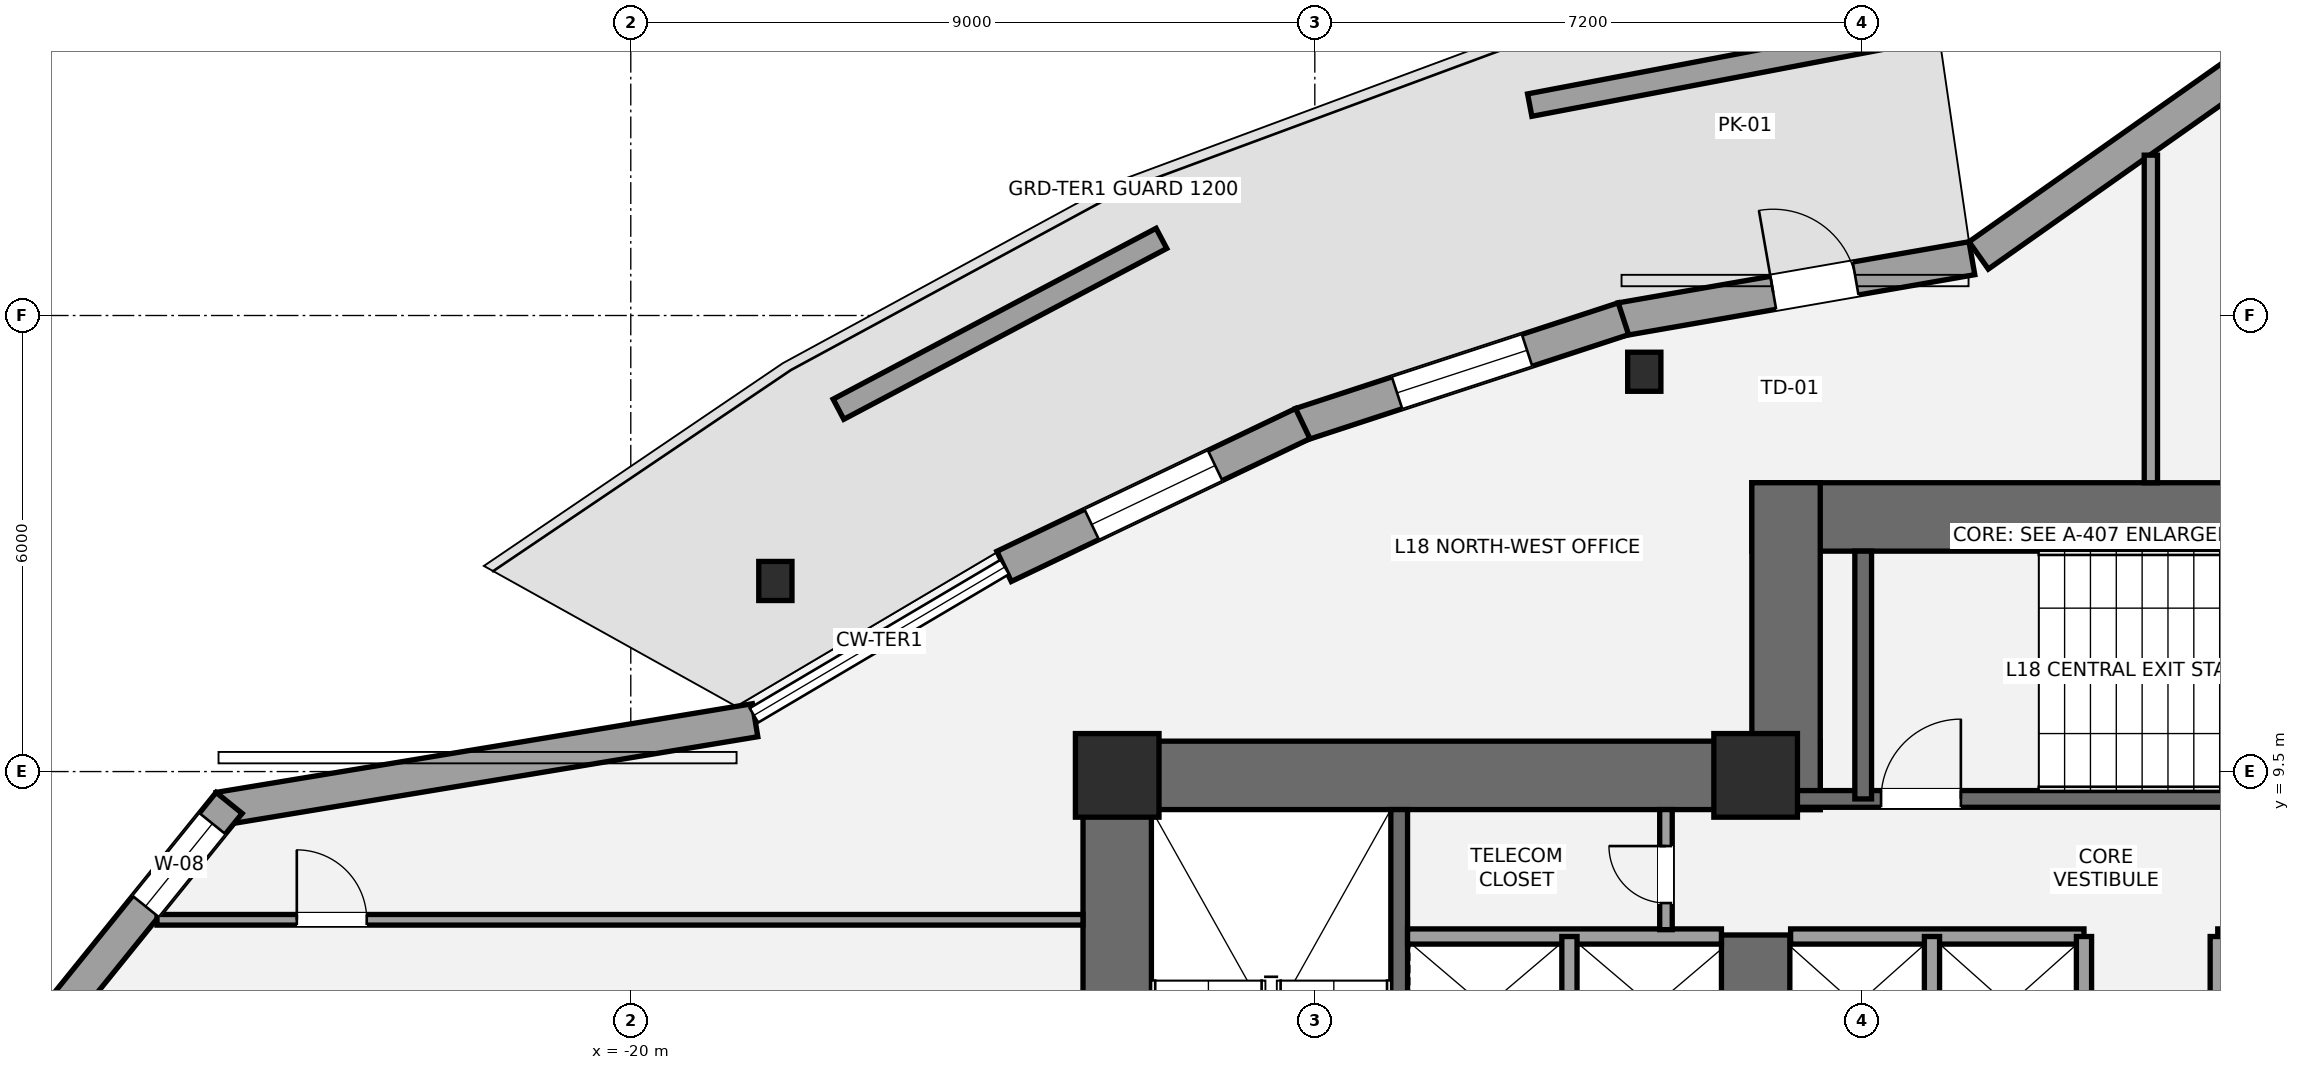
"""IFC4 building model, lengths in metres.
Left out: names, types, materials, properties, quantities, classifications, styles, units other than length and angle.
Written with IfcOpenShell. Run it as: python <this file> out.ifc"""

import sys

from ifc_helpers import new_model, si_unit, direction, frame, frame_2d, origin, origin_2d, place, context, subcontext, project, spatial, rectangle, i_section, extrude, element, fill, save


model = new_model("IFC4")
c1 = context("Model", 3, precision=1e-05, world=origin(), true_north=direction((0.0, 1.0)))
c2 = subcontext(c1, "Body", "Model", "MODEL_VIEW")
j1 = project(units=[si_unit("LENGTHUNIT", "METRE"), si_unit("PLANEANGLEUNIT", "RADIAN")], contexts=[c1])
p1 = place(None, origin())
s1 = spatial("IfcSite", under=j1, at=p1, CompositionType="ELEMENT")
p2 = place(p1, origin())
s2 = spatial("IfcBuilding", under=s1, at=p2, CompositionType="ELEMENT")
p3 = place(p2, frame((0.0, 0.0, 70.2)))
s3 = spatial("IfcBuildingStorey", under=s2, at=p3, CompositionType="ELEMENT", Elevation=70.2)
p4 = place(p3, frame((-13.6, 0.95, 0.0), z_axis=(0.0, 0.0, 1.0), x_axis=(0.0, 1.0, 0.0)))
e1 = element("IfcWall", 1, at=p4, inside=s3, PredefinedType="SHEAR", context=c2, shape_type="SweptSolid", body=[
    extrude(rectangle(XDim=8.95, YDim=0.9, at=frame_2d((4.475, 0.0))), origin(), (0.0, 0.0, 1.0), 3.6),
])
p5 = place(p3, frame((-14.05, 9.45, 0.0), z_axis=(0.0, 0.0, 1.0), x_axis=(1.0, 0.0, 0.0)))
e2 = element("IfcWall", 2, at=p5, inside=s3, PredefinedType="SHEAR", context=c2, shape_type="SweptSolid", body=[
    extrude(rectangle(XDim=9.7, YDim=0.9, at=frame_2d((4.85, 0.0))), origin(), (0.0, 0.0, 1.0), 3.6),
])
p6 = place(p3, frame((-5.2, 5.35, 0.0), z_axis=(0.0, 0.0, 1.0), x_axis=(0.0, 1.0, 0.0)))
e3 = element("IfcWall", 3, at=p6, inside=s3, PredefinedType="SHEAR", context=c2, shape_type="SweptSolid", body=[
    extrude(rectangle(XDim=2.0, YDim=0.9, at=frame_2d((1.0, 0.0))), origin(), (0.0, 0.0, 1.0), 3.6),
])
p7 = place(p3, frame((-9.89, 1.85, 0.0), z_axis=(0.0, 0.0, 1.0), x_axis=(0.0, 1.0, 0.0)))
e4 = element("IfcWall", 4, at=p7, inside=s3, PredefinedType="SHEAR", context=c2, shape_type="SweptSolid", body=[
    extrude(rectangle(XDim=7.15, YDim=0.22, at=frame_2d((3.575, 0.0))), origin(), (0.0, 0.0, 1.0), 3.6),
])
p8 = place(p3, frame((-5.25, 12.85, 0.0), z_axis=(0.0, 0.0, 1.0), x_axis=(1.0, 0.0, 0.0)))
e5 = element("IfcWall", 5, at=p8, inside=s3, PredefinedType="SHEAR", context=c2, shape_type="SweptSolid", body=[
    extrude(rectangle(XDim=10.5, YDim=0.9, at=frame_2d((5.25, 0.0))), origin(), (0.0, 0.0, 1.0), 3.6),
])
p9 = place(p3, frame((-4.8, 9.0, 0.0), z_axis=(0.0, 0.0, 1.0), x_axis=(0.0, 1.0, 0.0)))
e6 = element("IfcWall", 6, at=p9, inside=s3, PredefinedType="SHEAR", context=c2, shape_type="SweptSolid", body=[
    extrude(rectangle(XDim=4.3, YDim=0.9, at=frame_2d((2.15, 0.0))), origin(), (0.0, 0.0, 1.0), 3.6),
])
p10 = place(p3, frame((-4.7, 9.14, 0.0), z_axis=(0.0, 0.0, 1.0), x_axis=(1.0, 0.0, 0.0)))
e7 = element("IfcWall", 7, at=p10, inside=s3, PredefinedType="SHEAR", context=c2, shape_type="SweptSolid", body=[
    extrude(rectangle(XDim=9.3, YDim=0.22, at=frame_2d((4.65, 0.0))), origin(), (0.0, 0.0, 1.0), 3.6),
])
p11 = place(p10, frame((1.15, 0.0, 0.0)))
e8 = element("IfcOpeningElement", 8, at=p11, cuts=e7, PredefinedType="OPENING", context=c2, shape_type="SweptSolid", body=[
    extrude(rectangle(XDim=1.05, YDim=2.15, at=frame_2d((0.525, 1.075))), frame((0.0, 0.12, 0.0), z_axis=(0.0, -1.0, 0.0), x_axis=(1.0, 0.0, 0.0)), (0.0, 0.0, 1.0), 0.24),
])
p12 = place(p3, frame((-3.785, 9.14, 0.0), z_axis=(0.0, 0.0, 1.0), x_axis=(0.0, 1.0, 0.0)))
e9 = element("IfcWall", 9, at=p12, inside=s3, PredefinedType="SHEAR", context=c2, shape_type="SweptSolid", body=[
    extrude(rectangle(XDim=3.26, YDim=0.22, at=frame_2d((1.63, 0.0))), origin(), (0.0, 0.0, 1.0), 3.6),
])
for number, where, z_axis, x_axis in (
    (10, (-13.6, 9.45, 0.0), (0.0, 0.0, 1.0), (1.0, 0.0, 0.0)),
    (11, (-5.2, 9.45, 0.0), (0.0, 0.0, 1.0), (1.0, 0.0, 0.0)),
):
    element("IfcColumn", number, at=place(p3, frame(where, z_axis=z_axis, x_axis=x_axis)), inside=s3, PredefinedType="COLUMN", context=c2, shape_type="SweptSolid", body=[
        extrude(rectangle(XDim=1.1, YDim=1.1, at=origin_2d()), origin(), (0.0, 0.0, 1.0), 3.6),
    ])
for number, where, z_axis, x_axis in (
    (12, (-6.665, 14.76, 0.0), (0.0, 0.0, 1.0), (1.0, 0.0, 0.0)),
    (13, (-18.098, 12.007, 0.0), (0.0, 0.0, 1.0), (1.0, 0.0, 0.0)),
):
    element("IfcColumn", number, at=place(p3, frame(where, z_axis=z_axis, x_axis=x_axis)), inside=s3, PredefinedType="COLUMN", context=c2, shape_type="SweptSolid", body=[
        extrude(i_section(OverallWidth=0.437, OverallDepth=0.514, WebThickness=0.061, FlangeThickness=0.097, at=origin_2d()), origin(), (0.0, 0.0, 1.0), 3.6),
    ])
p13 = place(p3, frame((-2.266, 16.291, 0.0), z_axis=(0.0, 0.0, 1.0), x_axis=(0.817155536966, 0.576417234653, 0.0)))
e14 = element("IfcWall", 14, at=p13, inside=s3, PredefinedType="STANDARD", context=c2, shape_type="SweptSolid", body=[
    extrude(rectangle(XDim=6.524, YDim=0.44, at=frame_2d((3.262, 0.0))), origin(), (0.0, 0.0, 1.0), 2.533),
])
p14 = place(p3, frame((-6.971, 15.45, 0.0), z_axis=(0.0, 0.0, 1.0), x_axis=(0.985170808839, 0.171576447721, 0.0)))
e15 = element("IfcWall", 15, at=p14, inside=s3, PredefinedType="STANDARD", context=c2, shape_type="SweptSolid", body=[
    extrude(rectangle(XDim=4.686, YDim=0.44, at=frame_2d((2.343, 0.0))), origin(), (0.0, 0.0, 1.0), 2.533),
])
p15 = place(p14, frame((2.033, 0.0, 0.0)))
e16 = element("IfcOpeningElement", 16, at=p15, cuts=e15, PredefinedType="OPENING", context=c2, shape_type="SweptSolid", body=[
    extrude(rectangle(XDim=1.1, YDim=2.15, at=frame_2d((0.55, 1.075))), frame((0.0, 0.23, 0.0), z_axis=(0.0, -1.0, 0.0), x_axis=(1.0, 0.0, 0.0)), (0.0, 0.0, 1.0), 0.46),
])
p16 = place(p3, frame((-11.185, 14.067, 0.0), z_axis=(0.0, 0.0, 1.0), x_axis=(0.950342475624, 0.311206007373, 0.0)))
e17 = element("IfcWall", 17, at=p16, inside=s3, PredefinedType="STANDARD", context=c2, shape_type="SweptSolid", body=[
    extrude(rectangle(XDim=4.467, YDim=0.44, at=frame_2d((2.233, 0.0))), origin(), (0.0, 0.0, 1.0), 2.533),
])
p17 = place(p16, frame((1.333, 0.0, 0.65)))
e18 = element("IfcOpeningElement", 18, at=p17, cuts=e17, PredefinedType="OPENING", context=c2, shape_type="SweptSolid", body=[
    extrude(rectangle(XDim=1.8, YDim=1.7, at=frame_2d((0.9, 0.85))), frame((0.0, 0.23, 0.0), z_axis=(0.0, -1.0, 0.0), x_axis=(1.0, 0.0, 0.0)), (0.0, 0.0, 1.0), 0.46),
])
p18 = place(p3, frame((-15.088, 12.199, 0.0), z_axis=(0.0, 0.0, 1.0), x_axis=(0.902212943003, 0.431290859488, 0.0)))
e19 = element("IfcWall", 19, at=p18, inside=s3, PredefinedType="STANDARD", context=c2, shape_type="SweptSolid", body=[
    extrude(rectangle(XDim=4.355, YDim=0.44, at=frame_2d((2.178, 0.0))), origin(), (0.0, 0.0, 1.0), 2.533),
])
p19 = place(p18, frame((1.278, 0.0, 0.65)))
e20 = element("IfcOpeningElement", 20, at=p19, cuts=e19, PredefinedType="OPENING", context=c2, shape_type="SweptSolid", body=[
    extrude(rectangle(XDim=1.8, YDim=1.7, at=frame_2d((0.9, 0.85))), frame((0.0, 0.23, 0.0), z_axis=(0.0, -1.0, 0.0), x_axis=(1.0, 0.0, 0.0)), (0.0, 0.0, 1.0), 0.46),
])
p20 = place(p3, frame((-25.42, 9.009, 0.0), z_axis=(0.0, 0.0, 1.0), x_axis=(0.98660532948, 0.163125484956, 0.0)))
e21 = element("IfcWall", 21, at=p20, inside=s3, PredefinedType="STANDARD", context=c2, shape_type="SweptSolid", body=[
    extrude(rectangle(XDim=7.151, YDim=0.44, at=frame_2d((3.575, 0.0))), origin(), (0.0, 0.0, 1.0), 2.533),
])
p21 = place(p3, frame((-28.049, 5.666, 0.0), z_axis=(0.0, 0.0, 1.0), x_axis=(0.628444327975, 0.777854566507, 0.0)))
e22 = element("IfcWall", 22, at=p21, inside=s3, PredefinedType="STANDARD", context=c2, shape_type="SweptSolid", body=[
    extrude(rectangle(XDim=4.399, YDim=0.44, at=frame_2d((2.199, 0.0))), origin(), (0.0, 0.0, 1.0), 2.529),
])
p22 = place(p21, frame((2.649, 0.0, 0.58)))
e23 = element("IfcOpeningElement", 23, at=p22, cuts=e22, PredefinedType="OPENING", context=c2, shape_type="SweptSolid", body=[
    extrude(rectangle(XDim=1.4, YDim=1.55, at=frame_2d((0.7, 0.775))), frame((0.0, 0.23, 0.0), z_axis=(0.0, -1.0, 0.0), x_axis=(1.0, 0.0, 0.0)), (0.0, 0.0, 1.0), 0.46),
])
p23 = place(p3, frame((-2.802, 19.291, 0.0), z_axis=(0.0, 0.0, 1.0), x_axis=(-0.982347555163, -0.187064910836, 0.0)))
e24 = element("IfcWall", 24, at=p23, inside=s3, PredefinedType="PARAPET", context=c2, shape_type="SweptSolid", body=[
    extrude(rectangle(XDim=5.467, YDim=0.3, at=frame_2d((2.733, 0.0))), origin(), (0.0, 0.0, 1.0), 0.45),
])
p24 = place(p3, frame((-13.018, 16.515, 0.0), z_axis=(0.0, 0.0, 1.0), x_axis=(-0.883964513107, -0.467553996419, 0.0)))
e25 = element("IfcWall", 25, at=p24, inside=s3, PredefinedType="PARAPET", context=c2, shape_type="SweptSolid", body=[
    extrude(rectangle(XDim=4.807, YDim=0.3, at=frame_2d((2.404, 0.0))), origin(), (0.0, 0.0, 1.0), 0.45),
])
p25 = place(p3, frame((-9.78, 7.33, 0.0), z_axis=(0.0, 0.0, 1.0), x_axis=(1.0, 0.0, 0.0)))
e26 = element("IfcWall", 26, at=p25, inside=s3, PredefinedType="SOLIDWALL", context=c2, shape_type="SweptSolid", body=[
    extrude(rectangle(XDim=4.13, YDim=0.2, at=frame_2d((2.065, 0.0))), origin(), (0.0, 0.0, 1.0), 3.4),
])
p26 = place(p3, frame((-7.65, 5.47, 0.0), z_axis=(0.0, 0.0, 1.0), x_axis=(0.0, 1.0, 0.0)))
e27 = element("IfcWall", 27, at=p26, inside=s3, PredefinedType="SOLIDWALL", context=c2, shape_type="SweptSolid", body=[
    extrude(rectangle(XDim=1.86, YDim=0.2, at=frame_2d((0.93, 0.0))), origin(), (0.0, 0.0, 1.0), 3.4),
])
for number, where, z_axis, x_axis in (
    (28, (-4.74, 7.33, 0.0), (0.0, 0.0, 1.0), (1.0, 0.0, 0.0)),
    (29, (0.88, 7.33, 0.0), (0.0, 0.0, 1.0), (1.0, 0.0, 0.0)),
):
    element("IfcWall", number, at=place(p3, frame(where, z_axis=z_axis, x_axis=x_axis)), inside=s3, PredefinedType="SOLIDWALL", context=c2, shape_type="SweptSolid", body=[
        extrude(rectangle(XDim=3.86, YDim=0.2, at=frame_2d((1.93, 0.0))), origin(), (0.0, 0.0, 1.0), 3.4),
    ])
for number, where, z_axis, x_axis in (
    (30, (-2.88, 5.52, 0.0), (0.0, 0.0, 1.0), (0.0, 1.0, 0.0)),
    (31, (-0.88, 5.52, 0.0), (0.0, 0.0, 1.0), (0.0, 1.0, 0.0)),
    (32, (0.88, 5.52, 0.0), (0.0, 0.0, 1.0), (0.0, 1.0, 0.0)),
):
    element("IfcWall", number, at=place(p3, frame(where, z_axis=z_axis, x_axis=x_axis)), inside=s3, PredefinedType="SOLIDWALL", context=c2, shape_type="SweptSolid", body=[
        extrude(rectangle(XDim=1.81, YDim=0.2, at=frame_2d((0.905, 0.0))), origin(), (0.0, 0.0, 1.0), 3.4),
    ])
p27 = place(p3, frame((-6.38, 7.42, 0.0), z_axis=(0.0, 0.0, 1.0), x_axis=(0.0, 1.0, 0.0)))
e33 = element("IfcWall", 33, at=p27, inside=s3, PredefinedType="PARTITIONING", context=c2, shape_type="SweptSolid", body=[
    extrude(rectangle(XDim=1.58, YDim=0.165, at=frame_2d((0.79, 0.0))), origin(), (0.0, 0.0, 1.0), 3.4),
])
p28 = place(p27, frame((0.35, 0.0, 0.0)))
e34 = element("IfcOpeningElement", 34, at=p28, cuts=e33, PredefinedType="OPENING", context=c2, shape_type="SweptSolid", body=[
    extrude(rectangle(XDim=0.75, YDim=2.1, at=frame_2d((0.375, 1.05))), frame((0.0, 0.093, 0.0), z_axis=(0.0, -1.0, 0.0), x_axis=(1.0, 0.0, 0.0)), (0.0, 0.0, 1.0), 0.185),
])
p29 = place(p3, frame((-26.234, 7.55, 0.0), z_axis=(0.0, 0.0, 1.0), x_axis=(1.0, 0.0, 0.0)))
e35 = element("IfcWall", 35, at=p29, inside=s3, PredefinedType="PARTITIONING", context=c2, shape_type="SweptSolid", body=[
    extrude(rectangle(XDim=12.184, YDim=0.14, at=frame_2d((6.092, 0.0))), origin(), (0.0, 0.0, 1.0), 3.4),
])
p30 = place(p29, frame((1.84, 0.0, 0.0)))
e36 = element("IfcOpeningElement", 36, at=p30, cuts=e35, PredefinedType="OPENING", context=c2, shape_type="SweptSolid", body=[
    extrude(rectangle(XDim=0.92, YDim=2.15, at=frame_2d((0.46, 1.075))), frame((0.0, 0.08, 0.0), z_axis=(0.0, -1.0, 0.0), x_axis=(1.0, 0.0, 0.0)), (0.0, 0.0, 1.0), 0.16),
])
p31 = place(p3, frame((0.0, 13.3, 0.0), z_axis=(0.0, 0.0, 1.0), x_axis=(0.0, 1.0, 0.0)))
e37 = element("IfcWall", 37, at=p31, inside=s3, PredefinedType="PARTITIONING", context=c2, shape_type="SweptSolid", body=[
    extrude(rectangle(XDim=4.31, YDim=0.175, at=frame_2d((2.155, 0.0))), origin(), (0.0, 0.0, 1.0), 3.4),
])
p32 = place(p15, origin())
e38 = element("IfcDoor", 38, at=p32, inside=s3, OperationType="SINGLE_SWING_LEFT", PredefinedType="DOOR", context=c2, shape_type="SweptSolid", body=[
    extrude(rectangle(XDim=1.1, YDim=2.15, at=frame_2d((0.55, 1.075))), frame((0.0, 0.025, 0.0), z_axis=(0.0, -1.0, 0.0), x_axis=(1.0, 0.0, 0.0)), (0.0, 0.0, 1.0), 0.05),
])
fill(e16, e38)
p33 = place(p17, origin())
e39 = element("IfcWindow", 39, at=p33, inside=s3, PartitioningType="SINGLE_PANEL", PredefinedType="WINDOW", context=c2, shape_type="SweptSolid", body=[
    extrude(rectangle(XDim=1.8, YDim=1.7, at=frame_2d((0.9, 0.85))), frame((0.0, -0.01, 0.0), z_axis=(0.0, -1.0, 0.0), x_axis=(1.0, 0.0, 0.0)), (0.0, 0.0, 1.0), 0.06),
])
fill(e18, e39)
p34 = place(p19, origin())
e40 = element("IfcWindow", 40, at=p34, inside=s3, PartitioningType="SINGLE_PANEL", PredefinedType="WINDOW", context=c2, shape_type="SweptSolid", body=[
    extrude(rectangle(XDim=1.8, YDim=1.7, at=frame_2d((0.9, 0.85))), frame((0.0, -0.01, 0.0), z_axis=(0.0, -1.0, 0.0), x_axis=(1.0, 0.0, 0.0)), (0.0, 0.0, 1.0), 0.06),
])
fill(e20, e40)
p35 = place(p22, origin())
e41 = element("IfcWindow", 41, at=p35, inside=s3, PartitioningType="SINGLE_PANEL", PredefinedType="WINDOW", context=c2, shape_type="SweptSolid", body=[
    extrude(rectangle(XDim=1.4, YDim=1.55, at=frame_2d((0.7, 0.775))), frame((0.0, -0.01, 0.0), z_axis=(0.0, -1.0, 0.0), x_axis=(1.0, 0.0, 0.0)), (0.0, 0.0, 1.0), 0.06),
])
fill(e23, e41)
p36 = place(p11, origin())
e42 = element("IfcDoor", 42, at=p36, inside=s3, OperationType="SINGLE_SWING_RIGHT", PredefinedType="DOOR", context=c2, shape_type="SweptSolid", body=[
    extrude(rectangle(XDim=1.05, YDim=2.15, at=frame_2d((0.525, 1.075))), frame((0.0, 0.025, 0.0), z_axis=(0.0, -1.0, 0.0), x_axis=(1.0, 0.0, 0.0)), (0.0, 0.0, 1.0), 0.05),
])
fill(e8, e42)
p37 = place(p28, origin())
e43 = element("IfcDoor", 43, at=p37, inside=s3, OperationType="SINGLE_SWING_RIGHT", PredefinedType="DOOR", context=c2, shape_type="SweptSolid", body=[
    extrude(rectangle(XDim=0.75, YDim=2.1, at=frame_2d((0.375, 1.05))), frame((0.0, 0.025, 0.0), z_axis=(0.0, -1.0, 0.0), x_axis=(1.0, 0.0, 0.0)), (0.0, 0.0, 1.0), 0.05),
])
fill(e34, e43)
p38 = place(p30, origin())
e44 = element("IfcDoor", 44, at=p38, inside=s3, OperationType="SINGLE_SWING_LEFT", PredefinedType="DOOR", context=c2, shape_type="SweptSolid", body=[
    extrude(rectangle(XDim=0.92, YDim=2.15, at=frame_2d((0.46, 1.075))), frame((0.0, 0.025, 0.0), z_axis=(0.0, -1.0, 0.0), x_axis=(1.0, 0.0, 0.0)), (0.0, 0.0, 1.0), 0.05),
])
fill(e36, e44)
save(model, sys.argv[1])
